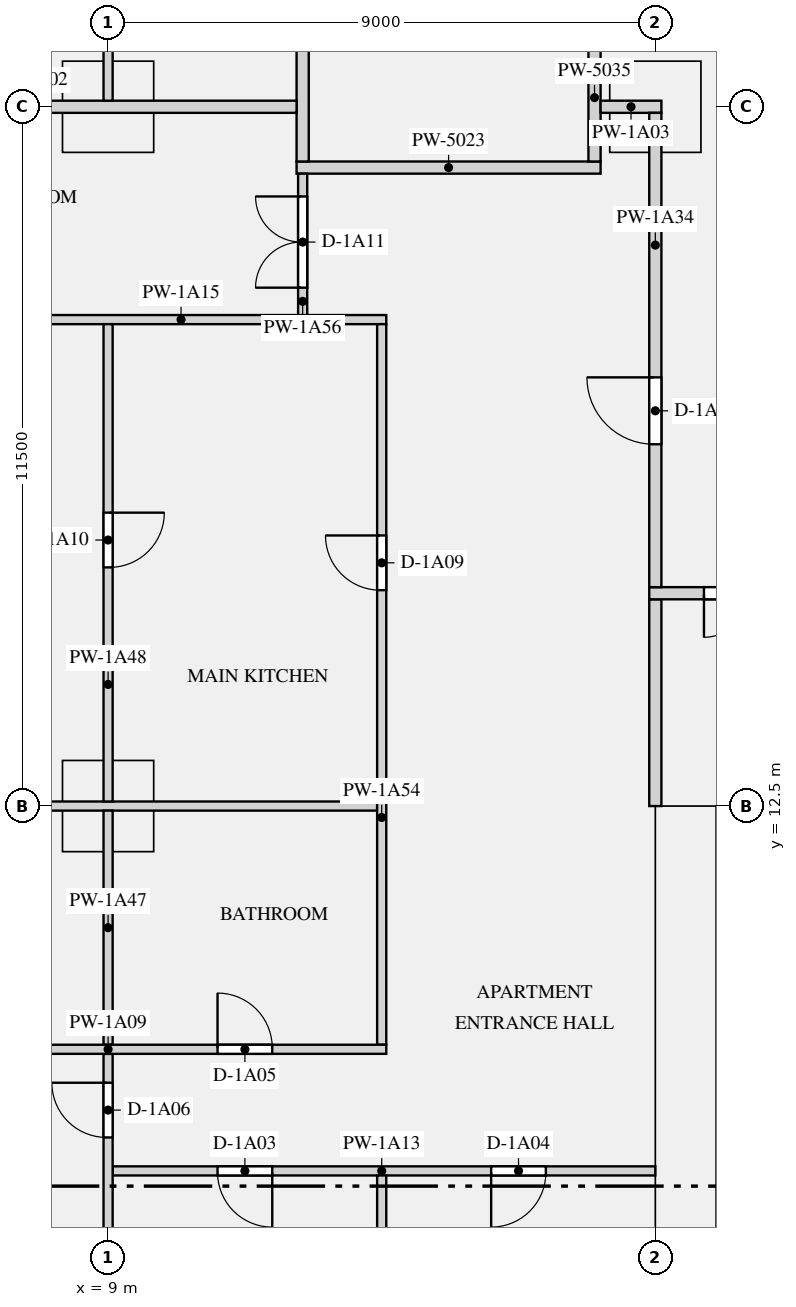
"""IFC4 building model, lengths in metres.
Left out: names, types, materials, properties, quantities, classifications, styles, units other than length and angle.
Written with IfcOpenShell. Run it as: python <this file> out.ifc"""

import sys

from ifc_helpers import new_model, si_unit, direction, frame, frame_2d, origin, origin_2d, place, context, subcontext, project, spatial, rectangle, extrude, element, fill, save


model = new_model("IFC4")
c1 = context("Model", 3, precision=1e-05, world=origin(), true_north=direction((0.0, 1.0)))
c2 = subcontext(c1, "Body", "Model", "MODEL_VIEW")
j1 = project(units=[si_unit("LENGTHUNIT", "METRE"), si_unit("PLANEANGLEUNIT", "RADIAN")], contexts=[c1])
p1 = place(None, origin())
s1 = spatial("IfcSite", under=j1, at=p1, CompositionType="ELEMENT")
p2 = place(p1, origin())
s2 = spatial("IfcBuilding", under=s1, at=p2, CompositionType="ELEMENT")
p3 = place(p2, frame((0.0, 0.0, 19.5)))
s3 = spatial("IfcBuildingStorey", under=s2, at=p3, CompositionType="ELEMENT", Elevation=19.5)
for number, where, z_axis, x_axis in (
    (1, (9.0, 24.0, 0.0), (0.0, 0.0, 1.0), (1.0, 0.0, 0.0)),
    (2, (18.0, 24.0, 0.0), (0.0, 0.0, 1.0), (1.0, 0.0, 0.0)),
    (3, (9.0, 12.5, 0.0), (0.0, 0.0, 1.0), (1.0, 0.0, 0.0)),
):
    element("IfcColumn", number, at=place(p3, frame(where, z_axis=z_axis, x_axis=x_axis)), inside=s3, PredefinedType="COLUMN", context=c2, shape_type="SweptSolid", body=[
        extrude(rectangle(XDim=1.5, YDim=1.5, at=origin_2d()), origin(), (0.0, 0.0, 1.0), 3.15),
    ])
p4 = place(p3, frame((18.5, 0.0, 0.0), z_axis=(0.0, 0.0, 1.0), x_axis=(0.0, 1.0, 0.0)))
e4 = element("IfcWall", 4, at=p4, inside=s3, PredefinedType="SHEAR", context=c2, shape_type="SweptSolid", body=[
    extrude(rectangle(XDim=12.5, YDim=1.0, at=frame_2d((6.25, 0.0))), origin(), (0.0, 0.0, 1.0), 3.15),
])
p5 = place(p3, frame((12.1, 23.0, 0.0), z_axis=(0.0, 0.0, 1.0), x_axis=(1.0, 0.0, 0.0)))
e5 = element("IfcWall", 5, at=p5, inside=s3, PredefinedType="PARTITIONING", context=c2, shape_type="SweptSolid", body=[
    extrude(rectangle(XDim=5.0, YDim=0.2, at=frame_2d((2.5, 0.0))), origin(), (0.0, 0.0, 1.0), 2.83),
])
p6 = place(p3, frame((18.0, 12.5, 0.0), z_axis=(0.0, 0.0, 1.0), x_axis=(0.0, 1.0, 0.0)))
e6 = element("IfcWall", 6, at=p6, inside=s3, PredefinedType="PARTITIONING", context=c2, shape_type="SweptSolid", body=[
    extrude(rectangle(XDim=3.4, YDim=0.2, at=frame_2d((1.7, 0.0))), origin(), (0.0, 0.0, 1.0), 2.83),
])
p7 = place(p3, frame((12.2, 23.1, 0.0), z_axis=(0.0, 0.0, 1.0), x_axis=(0.0, 1.0, 0.0)))
e7 = element("IfcWall", 7, at=p7, inside=s3, PredefinedType="PARTITIONING", context=c2, shape_type="SweptSolid", body=[
    extrude(rectangle(XDim=3.9, YDim=0.2, at=frame_2d((1.95, 0.0))), origin(), (0.0, 0.0, 1.0), 2.83),
])
p8 = place(p3, frame((17.0, 23.1, 0.0), z_axis=(0.0, 0.0, 1.0), x_axis=(0.0, 1.0, 0.0)))
e8 = element("IfcWall", 8, at=p8, inside=s3, PredefinedType="PARTITIONING", context=c2, shape_type="SweptSolid", body=[
    extrude(rectangle(XDim=3.8, YDim=0.2, at=frame_2d((1.9, 0.0))), origin(), (0.0, 0.0, 1.0), 2.83),
])
p9 = place(p8, frame((2.1, 0.0, 0.0)))
e9 = element("IfcOpeningElement", 9, at=p9, cuts=e8, PredefinedType="OPENING", context=c2, shape_type="SweptSolid", body=[
    extrude(rectangle(XDim=1.2, YDim=2.1, at=frame_2d((0.6, 1.05))), frame((0.0, 0.11, 0.0), z_axis=(0.0, -1.0, 0.0), x_axis=(1.0, 0.0, 0.0)), (0.0, 0.0, 1.0), 0.22),
])
p10 = place(p3, frame((3.3, 24.0, 0.0), z_axis=(0.0, 0.0, 1.0), x_axis=(1.0, 0.0, 0.0)))
e10 = element("IfcWall", 10, at=p10, inside=s3, PredefinedType="PARTITIONING", context=c2, shape_type="SweptSolid", body=[
    extrude(rectangle(XDim=8.8, YDim=0.2, at=frame_2d((4.4, 0.0))), origin(), (0.0, 0.0, 1.0), 2.83),
])
p11 = place(p3, frame((17.1, 24.0, 0.0), z_axis=(0.0, 0.0, 1.0), x_axis=(1.0, 0.0, 0.0)))
e11 = element("IfcWall", 11, at=p11, inside=s3, PredefinedType="PARTITIONING", context=c2, shape_type="SweptSolid", body=[
    extrude(rectangle(XDim=1.0, YDim=0.2, at=frame_2d((0.5, 0.0))), origin(), (0.0, 0.0, 1.0), 2.83),
])
p12 = place(p3, frame((0.8, 8.5, 0.0), z_axis=(0.0, 0.0, 1.0), x_axis=(1.0, 0.0, 0.0)))
e12 = element("IfcWall", 12, at=p12, inside=s3, PredefinedType="PARTITIONING", context=c2, shape_type="SweptSolid", body=[
    extrude(rectangle(XDim=12.775, YDim=0.15, at=frame_2d((6.387, 0.0))), origin(), (0.0, 0.0, 1.0), 2.83),
])
p13 = place(p12, frame((10.0, 0.0, 0.0)))
e13 = element("IfcOpeningElement", 13, at=p13, cuts=e12, PredefinedType="OPENING", context=c2, shape_type="SweptSolid", body=[
    extrude(rectangle(XDim=0.9, YDim=2.1, at=frame_2d((0.45, 1.05))), frame((0.0, 0.085, 0.0), z_axis=(0.0, -1.0, 0.0), x_axis=(1.0, 0.0, 0.0)), (0.0, 0.0, 1.0), 0.17),
])
p14 = place(p12, frame((1.325, 0.0, 0.0)))
e14 = element("IfcOpeningElement", 14, at=p14, cuts=e12, PredefinedType="OPENING", context=c2, shape_type="SweptSolid", body=[
    extrude(rectangle(XDim=0.9, YDim=2.1, at=frame_2d((0.45, 1.05))), frame((0.0, 0.085, 0.0), z_axis=(0.0, -1.0, 0.0), x_axis=(1.0, 0.0, 0.0)), (0.0, 0.0, 1.0), 0.17),
])
p15 = place(p12, frame((5.5, 0.0, 0.0)))
e15 = element("IfcOpeningElement", 15, at=p15, cuts=e12, PredefinedType="OPENING", context=c2, shape_type="SweptSolid", body=[
    extrude(rectangle(XDim=0.9, YDim=2.1, at=frame_2d((0.45, 1.05))), frame((0.0, 0.085, 0.0), z_axis=(0.0, -1.0, 0.0), x_axis=(1.0, 0.0, 0.0)), (0.0, 0.0, 1.0), 0.17),
])
p16 = place(p3, frame((0.8, 12.5, 0.0), z_axis=(0.0, 0.0, 1.0), x_axis=(1.0, 0.0, 0.0)))
e16 = element("IfcWall", 16, at=p16, inside=s3, PredefinedType="PARTITIONING", context=c2, shape_type="SweptSolid", body=[
    extrude(rectangle(XDim=12.625, YDim=0.15, at=frame_2d((6.312, 0.0))), origin(), (0.0, 0.0, 1.0), 2.83),
])
p17 = place(p3, frame((9.075, 6.5, 0.0), z_axis=(0.0, 0.0, 1.0), x_axis=(1.0, 0.0, 0.0)))
e17 = element("IfcWall", 17, at=p17, inside=s3, PredefinedType="PARTITIONING", context=c2, shape_type="SweptSolid", body=[
    extrude(rectangle(XDim=8.925, YDim=0.15, at=frame_2d((4.462, 0.0))), origin(), (0.0, 0.0, 1.0), 2.83),
])
p18 = place(p17, frame((1.725, 0.0, 0.0)))
e18 = element("IfcOpeningElement", 18, at=p18, cuts=e17, PredefinedType="OPENING", context=c2, shape_type="SweptSolid", body=[
    extrude(rectangle(XDim=0.9, YDim=2.1, at=frame_2d((0.45, 1.05))), frame((0.0, 0.085, 0.0), z_axis=(0.0, -1.0, 0.0), x_axis=(1.0, 0.0, 0.0)), (0.0, 0.0, 1.0), 0.17),
])
p19 = place(p17, frame((6.225, 0.0, 0.0)))
e19 = element("IfcOpeningElement", 19, at=p19, cuts=e17, PredefinedType="OPENING", context=c2, shape_type="SweptSolid", body=[
    extrude(rectangle(XDim=0.9, YDim=2.1, at=frame_2d((0.45, 1.05))), frame((0.0, 0.085, 0.0), z_axis=(0.0, -1.0, 0.0), x_axis=(1.0, 0.0, 0.0)), (0.0, 0.0, 1.0), 0.17),
])
p20 = place(p3, frame((3.3, 20.5, 0.0), z_axis=(0.0, 0.0, 1.0), x_axis=(1.0, 0.0, 0.0)))
e20 = element("IfcWall", 20, at=p20, inside=s3, PredefinedType="PARTITIONING", context=c2, shape_type="SweptSolid", body=[
    extrude(rectangle(XDim=10.275, YDim=0.15, at=frame_2d((5.137, 0.0))), origin(), (0.0, 0.0, 1.0), 2.83),
])
p21 = place(p20, frame((2.025, 0.0, 0.0)))
e21 = element("IfcOpeningElement", 21, at=p21, cuts=e20, PredefinedType="OPENING", context=c2, shape_type="SweptSolid", body=[
    extrude(rectangle(XDim=1.5, YDim=2.1, at=frame_2d((0.75, 1.05))), frame((0.0, 0.085, 0.0), z_axis=(0.0, -1.0, 0.0), x_axis=(1.0, 0.0, 0.0)), (0.0, 0.0, 1.0), 0.17),
])
p22 = place(p3, frame((17.9, 16.0, 0.0), z_axis=(0.0, 0.0, 1.0), x_axis=(1.0, 0.0, 0.0)))
e22 = element("IfcWall", 22, at=p22, inside=s3, PredefinedType="PARTITIONING", context=c2, shape_type="SweptSolid", body=[
    extrude(rectangle(XDim=36.2, YDim=0.2, at=frame_2d((18.1, 0.0))), origin(), (0.0, 0.0, 1.0), 2.83),
])
p23 = place(p22, frame((0.9, 0.0, 0.0)))
e23 = element("IfcOpeningElement", 23, at=p23, cuts=e22, PredefinedType="OPENING", context=c2, shape_type="SweptSolid", body=[
    extrude(rectangle(XDim=1.4, YDim=2.1, at=frame_2d((0.7, 1.05))), frame((0.0, 0.11, 0.0), z_axis=(0.0, -1.0, 0.0), x_axis=(1.0, 0.0, 0.0)), (0.0, 0.0, 1.0), 0.22),
])
p24 = place(p22, frame((33.9, 0.0, 0.0)))
e24 = element("IfcOpeningElement", 24, at=p24, cuts=e22, PredefinedType="OPENING", context=c2, shape_type="SweptSolid", body=[
    extrude(rectangle(XDim=1.4, YDim=2.1, at=frame_2d((0.7, 1.05))), frame((0.0, 0.11, 0.0), z_axis=(0.0, -1.0, 0.0), x_axis=(1.0, 0.0, 0.0)), (0.0, 0.0, 1.0), 0.22),
])
p25 = place(p3, frame((18.0, 16.1, 0.0), z_axis=(0.0, 0.0, 1.0), x_axis=(0.0, 1.0, 0.0)))
e25 = element("IfcWall", 25, at=p25, inside=s3, PredefinedType="PARTITIONING", context=c2, shape_type="SweptSolid", body=[
    extrude(rectangle(XDim=7.8, YDim=0.2, at=frame_2d((3.9, 0.0))), origin(), (0.0, 0.0, 1.0), 2.83),
])
p26 = place(p25, frame((2.35, 0.0, 0.0)))
e26 = element("IfcOpeningElement", 26, at=p26, cuts=e25, PredefinedType="OPENING", context=c2, shape_type="SweptSolid", body=[
    extrude(rectangle(XDim=1.1, YDim=2.1, at=frame_2d((0.55, 1.05))), frame((0.0, 0.11, 0.0), z_axis=(0.0, -1.0, 0.0), x_axis=(1.0, 0.0, 0.0)), (0.0, 0.0, 1.0), 0.22),
])
p27 = place(p3, frame((9.0, 0.8, 0.0), z_axis=(0.0, 0.0, 1.0), x_axis=(0.0, 1.0, 0.0)))
e27 = element("IfcWall", 27, at=p27, inside=s3, PredefinedType="PARTITIONING", context=c2, shape_type="SweptSolid", body=[
    extrude(rectangle(XDim=7.625, YDim=0.15, at=frame_2d((3.812, 0.0))), origin(), (0.0, 0.0, 1.0), 2.83),
])
p28 = place(p27, frame((6.25, 0.0, 0.0)))
e28 = element("IfcOpeningElement", 28, at=p28, cuts=e27, PredefinedType="OPENING", context=c2, shape_type="SweptSolid", body=[
    extrude(rectangle(XDim=0.9, YDim=2.1, at=frame_2d((0.45, 1.05))), frame((0.0, 0.085, 0.0), z_axis=(0.0, -1.0, 0.0), x_axis=(1.0, 0.0, 0.0)), (0.0, 0.0, 1.0), 0.17),
])
p29 = place(p3, frame((9.0, 8.575, 0.0), z_axis=(0.0, 0.0, 1.0), x_axis=(0.0, 1.0, 0.0)))
e29 = element("IfcWall", 29, at=p29, inside=s3, PredefinedType="PARTITIONING", context=c2, shape_type="SweptSolid", body=[
    extrude(rectangle(XDim=3.85, YDim=0.15, at=frame_2d((1.925, 0.0))), origin(), (0.0, 0.0, 1.0), 2.83),
])
p30 = place(p3, frame((9.0, 12.575, 0.0), z_axis=(0.0, 0.0, 1.0), x_axis=(0.0, 1.0, 0.0)))
e30 = element("IfcWall", 30, at=p30, inside=s3, PredefinedType="PARTITIONING", context=c2, shape_type="SweptSolid", body=[
    extrude(rectangle(XDim=7.85, YDim=0.15, at=frame_2d((3.925, 0.0))), origin(), (0.0, 0.0, 1.0), 2.83),
])
p31 = place(p30, frame((3.85, 0.0, 0.0)))
e31 = element("IfcOpeningElement", 31, at=p31, cuts=e30, PredefinedType="OPENING", context=c2, shape_type="SweptSolid", body=[
    extrude(rectangle(XDim=0.9, YDim=2.1, at=frame_2d((0.45, 1.05))), frame((0.0, 0.085, 0.0), z_axis=(0.0, -1.0, 0.0), x_axis=(1.0, 0.0, 0.0)), (0.0, 0.0, 1.0), 0.17),
])
p32 = place(p3, frame((9.0, 24.1, 0.0), z_axis=(0.0, 0.0, 1.0), x_axis=(0.0, 1.0, 0.0)))
e32 = element("IfcWall", 32, at=p32, inside=s3, PredefinedType="PARTITIONING", context=c2, shape_type="SweptSolid", body=[
    extrude(rectangle(XDim=12.075, YDim=0.15, at=frame_2d((6.038, 0.0))), origin(), (0.0, 0.0, 1.0), 2.83),
])
p33 = place(p32, frame((4.012, 0.0, 0.0)))
e33 = element("IfcOpeningElement", 33, at=p33, cuts=e32, PredefinedType="OPENING", context=c2, shape_type="SweptSolid", body=[
    extrude(rectangle(XDim=0.9, YDim=2.1, at=frame_2d((0.45, 1.05))), frame((0.0, 0.085, 0.0), z_axis=(0.0, -1.0, 0.0), x_axis=(1.0, 0.0, 0.0)), (0.0, 0.0, 1.0), 0.17),
])
p34 = place(p32, frame((9.012, 0.0, 0.0)))
e34 = element("IfcOpeningElement", 34, at=p34, cuts=e32, PredefinedType="OPENING", context=c2, shape_type="SweptSolid", body=[
    extrude(rectangle(XDim=0.9, YDim=2.1, at=frame_2d((0.45, 1.05))), frame((0.0, 0.085, 0.0), z_axis=(0.0, -1.0, 0.0), x_axis=(1.0, 0.0, 0.0)), (0.0, 0.0, 1.0), 0.17),
])
p35 = place(p3, frame((13.5, 0.8, 0.0), z_axis=(0.0, 0.0, 1.0), x_axis=(0.0, 1.0, 0.0)))
e35 = element("IfcWall", 35, at=p35, inside=s3, PredefinedType="PARTITIONING", context=c2, shape_type="SweptSolid", body=[
    extrude(rectangle(XDim=5.625, YDim=0.15, at=frame_2d((2.812, 0.0))), origin(), (0.0, 0.0, 1.0), 2.83),
])
p36 = place(p3, frame((13.5, 8.575, 0.0), z_axis=(0.0, 0.0, 1.0), x_axis=(0.0, 1.0, 0.0)))
e36 = element("IfcWall", 36, at=p36, inside=s3, PredefinedType="PARTITIONING", context=c2, shape_type="SweptSolid", body=[
    extrude(rectangle(XDim=11.85, YDim=0.15, at=frame_2d((5.925, 0.0))), origin(), (0.0, 0.0, 1.0), 2.83),
])
p37 = place(p36, frame((7.475, 0.0, 0.0)))
e37 = element("IfcOpeningElement", 37, at=p37, cuts=e36, PredefinedType="OPENING", context=c2, shape_type="SweptSolid", body=[
    extrude(rectangle(XDim=0.9, YDim=2.1, at=frame_2d((0.45, 1.05))), frame((0.0, 0.085, 0.0), z_axis=(0.0, -1.0, 0.0), x_axis=(1.0, 0.0, 0.0)), (0.0, 0.0, 1.0), 0.17),
])
p38 = place(p3, frame((12.2, 20.575, 0.0), z_axis=(0.0, 0.0, 1.0), x_axis=(0.0, 1.0, 0.0)))
e38 = element("IfcWall", 38, at=p38, inside=s3, PredefinedType="PARTITIONING", context=c2, shape_type="SweptSolid", body=[
    extrude(rectangle(XDim=2.325, YDim=0.15, at=frame_2d((1.163, 0.0))), origin(), (0.0, 0.0, 1.0), 2.83),
])
p39 = place(p38, frame((0.45, 0.0, 0.0)))
e39 = element("IfcOpeningElement", 39, at=p39, cuts=e38, PredefinedType="OPENING", context=c2, shape_type="SweptSolid", body=[
    extrude(rectangle(XDim=1.5, YDim=2.1, at=frame_2d((0.75, 1.05))), frame((0.0, 0.085, 0.0), z_axis=(0.0, -1.0, 0.0), x_axis=(1.0, 0.0, 0.0)), (0.0, 0.0, 1.0), 0.17),
])
p40 = place(p23, frame((1.4, 0.0, 0.0), z_axis=(0.0, 0.0, 1.0), x_axis=(-1.0, 0.0, 0.0)))
e40 = element("IfcDoor", 40, at=p40, inside=s3, OperationType="DOUBLE_DOOR_SINGLE_SWING", PredefinedType="DOOR", context=c2, shape_type="SweptSolid", body=[
    extrude(rectangle(XDim=1.4, YDim=2.1, at=frame_2d((0.7, 1.05))), frame((0.0, 0.025, 0.0), z_axis=(0.0, -1.0, 0.0), x_axis=(1.0, 0.0, 0.0)), (0.0, 0.0, 1.0), 0.05),
])
fill(e23, e40)
p41 = place(p18, frame((0.9, 0.0, 0.0), z_axis=(0.0, 0.0, 1.0), x_axis=(-1.0, 0.0, 0.0)))
e41 = element("IfcDoor", 41, at=p41, inside=s3, OperationType="SINGLE_SWING_LEFT", PredefinedType="DOOR", context=c2, shape_type="SweptSolid", body=[
    extrude(rectangle(XDim=0.9, YDim=2.1, at=frame_2d((0.45, 1.05))), frame((0.0, 0.025, 0.0), z_axis=(0.0, -1.0, 0.0), x_axis=(1.0, 0.0, 0.0)), (0.0, 0.0, 1.0), 0.05),
])
fill(e18, e41)
p42 = place(p19, frame((0.9, 0.0, 0.0), z_axis=(0.0, 0.0, 1.0), x_axis=(-1.0, 0.0, 0.0)))
e42 = element("IfcDoor", 42, at=p42, inside=s3, OperationType="SINGLE_SWING_RIGHT", PredefinedType="DOOR", context=c2, shape_type="SweptSolid", body=[
    extrude(rectangle(XDim=0.9, YDim=2.1, at=frame_2d((0.45, 1.05))), frame((0.0, 0.025, 0.0), z_axis=(0.0, -1.0, 0.0), x_axis=(1.0, 0.0, 0.0)), (0.0, 0.0, 1.0), 0.05),
])
fill(e19, e42)
p43 = place(p13, origin())
e43 = element("IfcDoor", 43, at=p43, inside=s3, OperationType="SINGLE_SWING_LEFT", PredefinedType="DOOR", context=c2, shape_type="SweptSolid", body=[
    extrude(rectangle(XDim=0.9, YDim=2.1, at=frame_2d((0.45, 1.05))), frame((0.0, 0.025, 0.0), z_axis=(0.0, -1.0, 0.0), x_axis=(1.0, 0.0, 0.0)), (0.0, 0.0, 1.0), 0.05),
])
fill(e13, e43)
p44 = place(p28, origin())
e44 = element("IfcDoor", 44, at=p44, inside=s3, OperationType="SINGLE_SWING_RIGHT", PredefinedType="DOOR", context=c2, shape_type="SweptSolid", body=[
    extrude(rectangle(XDim=0.9, YDim=2.1, at=frame_2d((0.45, 1.05))), frame((0.0, 0.025, 0.0), z_axis=(0.0, -1.0, 0.0), x_axis=(1.0, 0.0, 0.0)), (0.0, 0.0, 1.0), 0.05),
])
fill(e28, e44)
p45 = place(p37, origin())
e45 = element("IfcDoor", 45, at=p45, inside=s3, OperationType="SINGLE_SWING_RIGHT", PredefinedType="DOOR", context=c2, shape_type="SweptSolid", body=[
    extrude(rectangle(XDim=0.9, YDim=2.1, at=frame_2d((0.45, 1.05))), frame((0.0, 0.025, 0.0), z_axis=(0.0, -1.0, 0.0), x_axis=(1.0, 0.0, 0.0)), (0.0, 0.0, 1.0), 0.05),
])
fill(e37, e45)
p46 = place(p31, frame((0.9, 0.0, 0.0), z_axis=(0.0, 0.0, 1.0), x_axis=(-1.0, 0.0, 0.0)))
e46 = element("IfcDoor", 46, at=p46, inside=s3, OperationType="SINGLE_SWING_LEFT", PredefinedType="DOOR", context=c2, shape_type="SweptSolid", body=[
    extrude(rectangle(XDim=0.9, YDim=2.1, at=frame_2d((0.45, 1.05))), frame((0.0, 0.025, 0.0), z_axis=(0.0, -1.0, 0.0), x_axis=(1.0, 0.0, 0.0)), (0.0, 0.0, 1.0), 0.05),
])
fill(e31, e46)
p47 = place(p39, origin())
e47 = element("IfcDoor", 47, at=p47, inside=s3, OperationType="DOUBLE_DOOR_SINGLE_SWING", PredefinedType="DOOR", context=c2, shape_type="SweptSolid", body=[
    extrude(rectangle(XDim=1.5, YDim=2.1, at=frame_2d((0.75, 1.05))), frame((0.0, 0.025, 0.0), z_axis=(0.0, -1.0, 0.0), x_axis=(1.0, 0.0, 0.0)), (0.0, 0.0, 1.0), 0.05),
])
fill(e39, e47)
p48 = place(p26, origin())
e48 = element("IfcDoor", 48, at=p48, inside=s3, OperationType="SINGLE_SWING_RIGHT", PredefinedType="DOOR", context=c2, shape_type="SweptSolid", body=[
    extrude(rectangle(XDim=1.1, YDim=2.1, at=frame_2d((0.55, 1.05))), frame((0.0, 0.025, 0.0), z_axis=(0.0, -1.0, 0.0), x_axis=(1.0, 0.0, 0.0)), (0.0, 0.0, 1.0), 0.05),
])
fill(e26, e48)
save(model, sys.argv[1])
